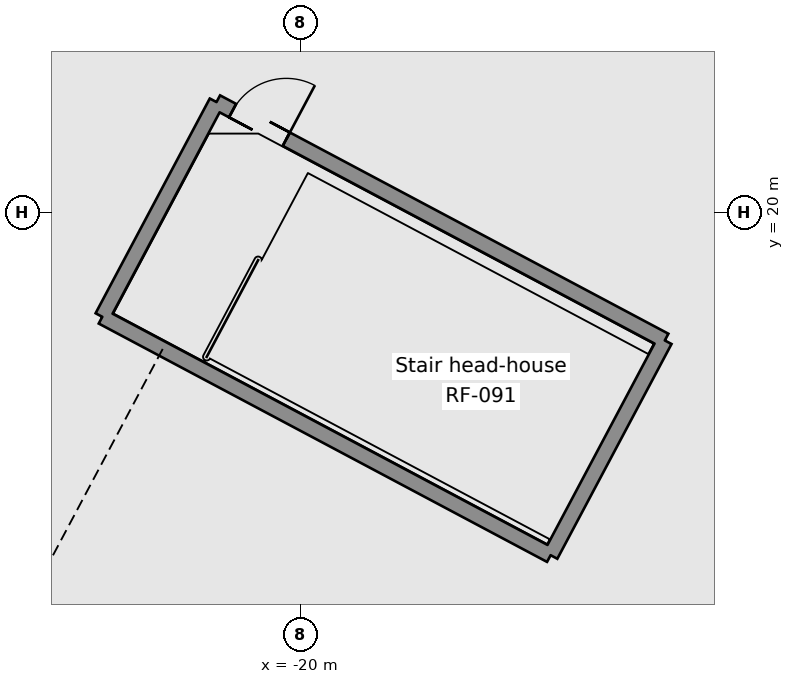
"""IFC4 building model, lengths in metres.
Left out: names, types, materials, properties, quantities, classifications, styles, units other than length and angle.
Written with IfcOpenShell. Run it as: python <this file> out.ifc"""

import sys

from ifc_helpers import new_model, si_unit, direction, frame, frame_2d, origin, place, context, subcontext, project, spatial, rectangle, extrude, element, fill, save


model = new_model("IFC4")
c1 = context("Model", 3, precision=1e-05, world=origin(), true_north=direction((0.0, 1.0)))
c2 = subcontext(c1, "Body", "Model", "MODEL_VIEW")
j1 = project(units=[si_unit("LENGTHUNIT", "METRE"), si_unit("PLANEANGLEUNIT", "RADIAN")], contexts=[c1])
p1 = place(None, origin())
s1 = spatial("IfcSite", under=j1, at=p1, CompositionType="ELEMENT")
p2 = place(p1, origin())
s2 = spatial("IfcBuilding", under=s1, at=p2, CompositionType="ELEMENT")
p3 = place(p2, frame((0.0, 0.0, 357.6)))
s3 = spatial("IfcBuildingStorey", under=s2, at=p3, CompositionType="ELEMENT", Elevation=357.6)
p4 = place(p3, frame((-21.385, 21.819, 0.0), z_axis=(0.0, 0.0, 1.0), x_axis=(0.882948721512, -0.469469440091, 0.0)))
e1 = element("IfcWall", 1, at=p4, inside=s3, PredefinedType="STANDARD", context=c2, shape_type="SweptSolid", body=[
    extrude(rectangle(XDim=8.35, YDim=0.25, at=frame_2d((4.175, 0.0))), origin(), (0.0, 0.0, 1.0), 3.2),
])
p5 = place(p4, frame((0.3, 0.0, 0.0)))
e2 = element("IfcOpeningElement", 2, at=p5, cuts=e1, PredefinedType="OPENING", context=c2, shape_type="SweptSolid", body=[
    extrude(rectangle(XDim=1.0, YDim=2.1, at=frame_2d((0.5, 1.05))), frame((0.0, 0.135, 0.0), z_axis=(0.0, -1.0, 0.0), x_axis=(1.0, 0.0, 0.0)), (0.0, 0.0, 1.0), 0.27),
])
p6 = place(p3, frame((-14.012, 17.898, 0.0), z_axis=(0.0, 0.0, 1.0), x_axis=(-0.469485426614, -0.882940221191, 0.0)))
e3 = element("IfcWall", 3, at=p6, inside=s3, PredefinedType="STANDARD", context=c2, shape_type="SweptSolid", body=[
    extrude(rectangle(XDim=4.0, YDim=0.25, at=frame_2d((2.0, 0.0))), origin(), (0.0, 0.0, 1.0), 3.2),
])
p7 = place(p3, frame((-15.89, 14.367, 0.0), z_axis=(0.0, 0.0, 1.0), x_axis=(-0.882960840913, 0.469446645972, 0.0)))
e4 = element("IfcWall", 4, at=p7, inside=s3, PredefinedType="STANDARD", context=c2, shape_type="SweptSolid", body=[
    extrude(rectangle(XDim=8.35, YDim=0.25, at=frame_2d((4.175, 0.0))), origin(), (0.0, 0.0, 1.0), 3.2),
])
p8 = place(p3, frame((-23.263, 18.287, 0.0), z_axis=(0.0, 0.0, 1.0), x_axis=(0.469460126868, 0.882953673349, 0.0)))
e5 = element("IfcWall", 5, at=p8, inside=s3, PredefinedType="STANDARD", context=c2, shape_type="SweptSolid", body=[
    extrude(rectangle(XDim=4.0, YDim=0.25, at=frame_2d((2.0, 0.0))), origin(), (0.0, 0.0, 1.0), 3.2),
])
p9 = place(p5, origin())
e6 = element("IfcDoor", 6, at=p9, inside=s3, OperationType="SINGLE_SWING_RIGHT", PredefinedType="DOOR", context=c2, shape_type="SweptSolid", body=[
    extrude(rectangle(XDim=1.0, YDim=2.1, at=frame_2d((0.5, 1.05))), frame((0.0, 0.025, 0.0), z_axis=(0.0, -1.0, 0.0), x_axis=(1.0, 0.0, 0.0)), (0.0, 0.0, 1.0), 0.05),
])
fill(e2, e6)
save(model, sys.argv[1])
